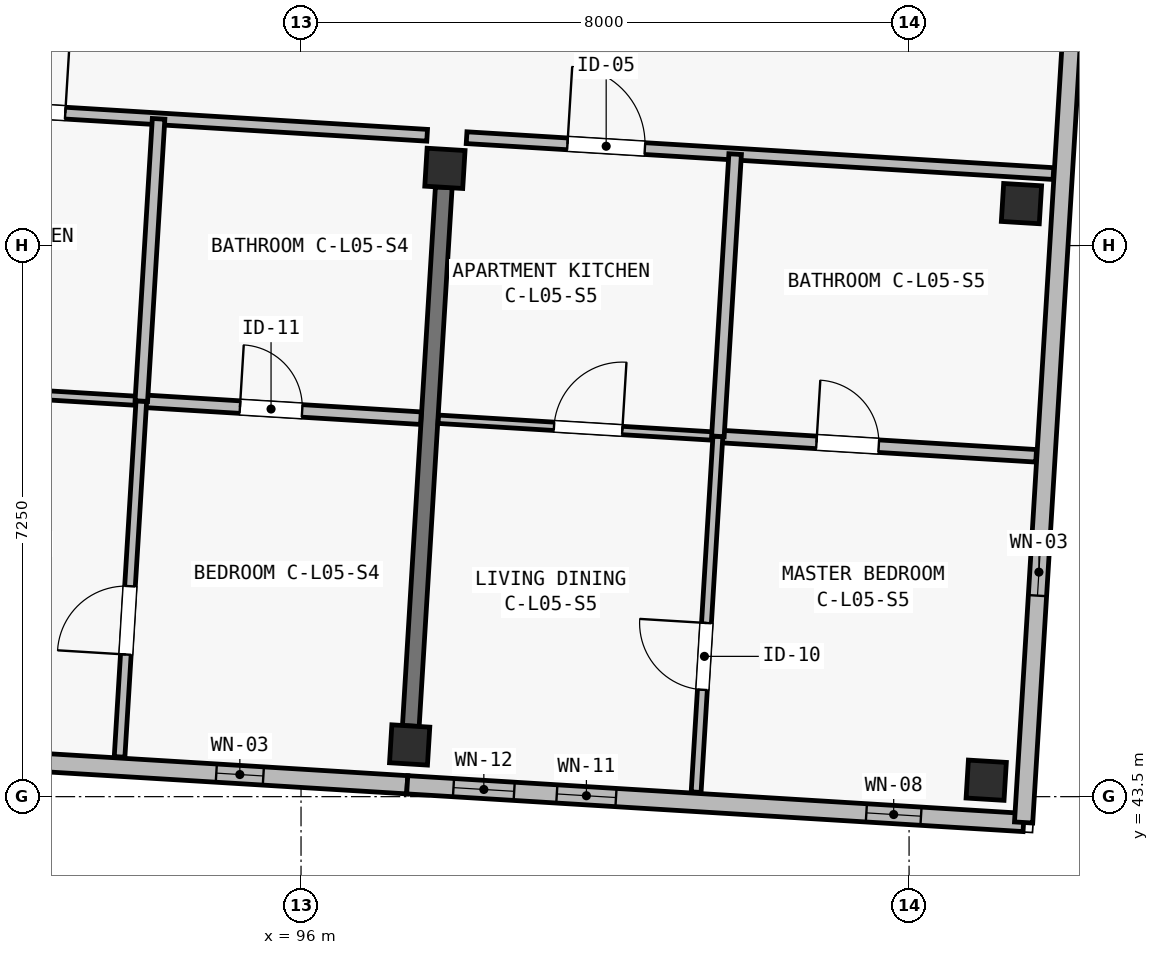
"""IFC4 building model, lengths in metres.
Left out: names, types, materials, properties, quantities, classifications, styles, units other than length and angle.
Written with IfcOpenShell. Run it as: python <this file> out.ifc"""

import sys

from ifc_helpers import new_model, si_unit, direction, frame, frame_2d, origin, origin_2d, place, context, subcontext, project, spatial, rectangle, extrude, element, fill, save


model = new_model("IFC4")
c1 = context("Model", 3, precision=1e-05, world=origin(), true_north=direction((0.0, 1.0)))
c2 = subcontext(c1, "Body", "Model", "MODEL_VIEW")
j1 = project(units=[si_unit("LENGTHUNIT", "METRE"), si_unit("PLANEANGLEUNIT", "RADIAN")], contexts=[c1])
p1 = place(None, origin())
s1 = spatial("IfcSite", under=j1, at=p1, CompositionType="ELEMENT")
p2 = place(p1, origin())
s2 = spatial("IfcBuilding", under=s1, at=p2, CompositionType="ELEMENT")
p3 = place(p2, frame((0.0, 0.0, 18.15)))
s3 = spatial("IfcBuildingStorey", under=s2, at=p3, CompositionType="ELEMENT", Elevation=18.15)
for number, where, z_axis, x_axis in (
    (1, (97.429, 44.18, 0.0), (0.0, 0.0, 1.0), (0.998, -0.061, 0.0)),
    (2, (97.893, 51.766, 0.0), (0.0, 0.0, 1.0), (0.998, -0.061, 0.0)),
    (3, (105.015, 43.716, 0.0), (0.0, 0.0, 1.0), (0.998, -0.061, 0.0)),
    (4, (105.479, 51.302, 0.0), (0.0, 0.0, 1.0), (0.998, -0.061, 0.0)),
):
    element("IfcColumn", number, at=place(p3, frame(where, z_axis=z_axis, x_axis=x_axis)), inside=s3, PredefinedType="COLUMN", context=c2, shape_type="SweptSolid", body=[
        extrude(rectangle(XDim=0.5, YDim=0.5, at=origin_2d()), origin(), (0.0, 0.0, 1.0), 3.25),
    ])
p4 = place(p3, frame((97.444, 44.43, 0.0), z_axis=(0.0, 0.0, 1.0), x_axis=(0.061070212127, 0.998133472633, 0.0)))
e5 = element("IfcWall", 5, at=p4, inside=s3, PredefinedType="SHEAR", context=c2, shape_type="SweptSolid", body=[
    extrude(rectangle(XDim=7.1, YDim=0.22, at=frame_2d((3.55, 0.0))), origin(), (0.0, 0.0, 1.0), 2.5),
])
p5 = place(p3, frame((97.397, 43.656, 0.0), z_axis=(0.0, 0.0, 1.0), x_axis=(-0.998135549572, 0.061036257095, 0.0)))
e6 = element("IfcWall", 6, at=p5, inside=s3, PredefinedType="SOLIDWALL", context=c2, shape_type="SweptSolid", body=[
    extrude(rectangle(XDim=7.6, YDim=0.24, at=frame_2d((3.8, 0.0))), origin(), (0.0, 0.0, 1.0), 3.0),
])
p6 = place(p5, frame((1.896, 0.0, 0.42)))
e7 = element("IfcOpeningElement", 7, at=p6, cuts=e6, PredefinedType="OPENING", context=c2, shape_type="SweptSolid", body=[
    extrude(rectangle(XDim=0.62, YDim=2.28, at=frame_2d((0.31, 1.14))), frame((0.0, 0.135, 0.0), z_axis=(0.0, -1.0, 0.0), x_axis=(1.0, 0.0, 0.0)), (0.0, 0.0, 1.0), 0.27),
])
p7 = place(p5, frame((5.073, 0.0, 0.42)))
e8 = element("IfcOpeningElement", 8, at=p7, cuts=e6, PredefinedType="OPENING", context=c2, shape_type="SweptSolid", body=[
    extrude(rectangle(XDim=0.68, YDim=2.24, at=frame_2d((0.34, 1.12))), frame((0.0, 0.135, 0.0), z_axis=(0.0, -1.0, 0.0), x_axis=(1.0, 0.0, 0.0)), (0.0, 0.0, 1.0), 0.27),
])
p8 = place(p3, frame((105.507, 43.16, 0.0), z_axis=(0.0, 0.0, 1.0), x_axis=(-0.998134248939, 0.061057522844, 0.0)))
e9 = element("IfcWall", 9, at=p8, inside=s3, PredefinedType="SOLIDWALL", context=c2, shape_type="SweptSolid", body=[
    extrude(rectangle(XDim=8.125, YDim=0.24, at=frame_2d((4.062, 0.0))), origin(), (0.0, 0.0, 1.0), 3.0),
])
p9 = place(p8, frame((1.353, 0.0, 0.48)))
e10 = element("IfcOpeningElement", 10, at=p9, cuts=e9, PredefinedType="OPENING", context=c2, shape_type="SweptSolid", body=[
    extrude(rectangle(XDim=0.72, YDim=2.16, at=frame_2d((0.36, 1.08))), frame((0.0, 0.135, 0.0), z_axis=(0.0, -1.0, 0.0), x_axis=(1.0, 0.0, 0.0)), (0.0, 0.0, 1.0), 0.27),
])
p10 = place(p8, frame((5.373, 0.0, 0.48)))
e11 = element("IfcOpeningElement", 11, at=p10, cuts=e9, PredefinedType="OPENING", context=c2, shape_type="SweptSolid", body=[
    extrude(rectangle(XDim=0.78, YDim=2.2, at=frame_2d((0.39, 1.1))), frame((0.0, 0.135, 0.0), z_axis=(0.0, -1.0, 0.0), x_axis=(1.0, 0.0, 0.0)), (0.0, 0.0, 1.0), 0.27),
])
p11 = place(p8, frame((6.715, 0.0, 0.52)))
e12 = element("IfcOpeningElement", 12, at=p11, cuts=e9, PredefinedType="OPENING", context=c2, shape_type="SweptSolid", body=[
    extrude(rectangle(XDim=0.8, YDim=2.3, at=frame_2d((0.4, 1.15))), frame((0.0, 0.135, 0.0), z_axis=(0.0, -1.0, 0.0), x_axis=(1.0, 0.0, 0.0)), (0.0, 0.0, 1.0), 0.27),
])
p12 = place(p3, frame((106.768, 63.771, 0.0), z_axis=(0.0, 0.0, 1.0), x_axis=(-0.061053332998, -0.99813450523, 0.0)))
e13 = element("IfcWall", 13, at=p12, inside=s3, PredefinedType="SOLIDWALL", context=c2, shape_type="SweptSolid", body=[
    extrude(rectangle(XDim=20.65, YDim=0.24, at=frame_2d((10.325, 0.0))), origin(), (0.0, 0.0, 1.0), 3.0),
])
p13 = place(p12, frame((2.63, 0.0, 0.52)))
e14 = element("IfcOpeningElement", 14, at=p13, cuts=e13, PredefinedType="OPENING", context=c2, shape_type="SweptSolid", body=[
    extrude(rectangle(XDim=0.78, YDim=2.2, at=frame_2d((0.39, 1.1))), frame((0.0, 0.135, 0.0), z_axis=(0.0, -1.0, 0.0), x_axis=(1.0, 0.0, 0.0)), (0.0, 0.0, 1.0), 0.27),
])
p14 = place(p12, frame((17.04, 0.0, 0.45)))
e15 = element("IfcOpeningElement", 15, at=p14, cuts=e13, PredefinedType="OPENING", context=c2, shape_type="SweptSolid", body=[
    extrude(rectangle(XDim=0.62, YDim=2.28, at=frame_2d((0.31, 1.14))), frame((0.0, 0.135, 0.0), z_axis=(0.0, -1.0, 0.0), x_axis=(1.0, 0.0, 0.0)), (0.0, 0.0, 1.0), 0.27),
])
p15 = place(p3, frame((90.593, 52.633, 0.0), z_axis=(0.0, 0.0, 1.0), x_axis=(0.998135538078, -0.061036445065, 0.0)))
e16 = element("IfcWall", 16, at=p15, inside=s3, PredefinedType="PARTITIONING", context=c2, shape_type="SweptSolid", body=[
    extrude(rectangle(XDim=7.08, YDim=0.155, at=frame_2d((3.54, 0.0))), origin(), (0.0, 0.0, 1.0), 2.97),
])
p16 = place(p15, frame((1.33, 0.0, 0.0)))
e17 = element("IfcOpeningElement", 17, at=p16, cuts=e16, PredefinedType="OPENING", context=c2, shape_type="SweptSolid", body=[
    extrude(rectangle(XDim=0.98, YDim=2.15, at=frame_2d((0.49, 1.075))), frame((0.0, 0.093, 0.0), z_axis=(0.0, -1.0, 0.0), x_axis=(1.0, 0.0, 0.0)), (0.0, 0.0, 1.0), 0.185),
])
p17 = place(p3, frame((90.221, 48.929, 0.0), z_axis=(0.0, 0.0, 1.0), x_axis=(0.99813243538, -0.061087162657, 0.0)))
e18 = element("IfcWall", 18, at=p17, inside=s3, PredefinedType="PARTITIONING", context=c2, shape_type="SweptSolid", body=[
    extrude(rectangle(XDim=3.685, YDim=0.12, at=frame_2d((1.842, 0.0))), origin(), (0.0, 0.0, 1.0), 2.97),
])
p18 = place(p17, frame((1.525, 0.0, 0.0)))
e19 = element("IfcOpeningElement", 19, at=p18, cuts=e18, PredefinedType="OPENING", context=c2, shape_type="SweptSolid", body=[
    extrude(rectangle(XDim=0.9, YDim=2.1, at=frame_2d((0.45, 1.05))), frame((0.0, 0.075, 0.0), z_axis=(0.0, -1.0, 0.0), x_axis=(1.0, 0.0, 0.0)), (0.0, 0.0, 1.0), 0.15),
])
p19 = place(p3, frame((93.899, 48.704, 0.0), z_axis=(0.0, 0.0, 1.0), x_axis=(0.998136719672, -0.061017119263, 0.0)))
e20 = element("IfcWall", 20, at=p19, inside=s3, PredefinedType="PLUMBINGWALL", context=c2, shape_type="SweptSolid", body=[
    extrude(rectangle(XDim=3.685, YDim=0.165, at=frame_2d((1.843, 0.0))), origin(), (0.0, 0.0, 1.0), 2.97),
])
p20 = place(p19, frame((1.3, 0.0, 0.0)))
e21 = element("IfcOpeningElement", 21, at=p20, cuts=e20, PredefinedType="OPENING", context=c2, shape_type="SweptSolid", body=[
    extrude(rectangle(XDim=0.82, YDim=2.08, at=frame_2d((0.41, 1.04))), frame((0.0, 0.097, 0.0), z_axis=(0.0, -1.0, 0.0), x_axis=(1.0, 0.0, 0.0)), (0.0, 0.0, 1.0), 0.195),
])
p21 = place(p3, frame((93.612, 44.023, 0.0), z_axis=(0.0, 0.0, 1.0), x_axis=(0.061062434628, 0.998133948465, 0.0)))
e22 = element("IfcWall", 22, at=p21, inside=s3, PredefinedType="PARTITIONING", context=c2, shape_type="SweptSolid", body=[
    extrude(rectangle(XDim=4.69, YDim=0.14, at=frame_2d((2.345, 0.0))), origin(), (0.0, 0.0, 1.0), 2.97),
])
p22 = place(p21, frame((1.35, 0.0, 0.0)))
e23 = element("IfcOpeningElement", 23, at=p22, cuts=e22, PredefinedType="OPENING", context=c2, shape_type="SweptSolid", body=[
    extrude(rectangle(XDim=0.9, YDim=2.1, at=frame_2d((0.45, 1.05))), frame((0.0, 0.085, 0.0), z_axis=(0.0, -1.0, 0.0), x_axis=(1.0, 0.0, 0.0)), (0.0, 0.0, 1.0), 0.17),
])
p23 = place(p3, frame((93.899, 48.704, 0.0), z_axis=(0.0, 0.0, 1.0), x_axis=(0.061034005467, 0.998135687257, 0.0)))
e24 = element("IfcWall", 24, at=p23, inside=s3, PredefinedType="PLUMBINGWALL", context=c2, shape_type="SweptSolid", body=[
    extrude(rectangle(XDim=3.72, YDim=0.165, at=frame_2d((1.86, 0.0))), origin(), (0.0, 0.0, 1.0), 2.97),
])
p24 = place(p3, frame((98.178, 52.169, 0.0), z_axis=(0.0, 0.0, 1.0), x_axis=(0.998133272394, -0.061073484761, 0.0)))
e25 = element("IfcWall", 25, at=p24, inside=s3, PredefinedType="PARTITIONING", context=c2, shape_type="SweptSolid", body=[
    extrude(rectangle(XDim=7.735, YDim=0.155, at=frame_2d((3.868, 0.0))), origin(), (0.0, 0.0, 1.0), 2.97),
])
p25 = place(p24, frame((1.33, 0.0, 0.0)))
e26 = element("IfcOpeningElement", 26, at=p25, cuts=e25, PredefinedType="OPENING", context=c2, shape_type="SweptSolid", body=[
    extrude(rectangle(XDim=1.02, YDim=2.2, at=frame_2d((0.51, 1.1))), frame((0.0, 0.093, 0.0), z_axis=(0.0, -1.0, 0.0), x_axis=(1.0, 0.0, 0.0)), (0.0, 0.0, 1.0), 0.185),
])
p26 = place(p3, frame((97.806, 48.465, 0.0), z_axis=(0.0, 0.0, 1.0), x_axis=(0.998136719672, -0.061017119263, 0.0)))
e27 = element("IfcWall", 27, at=p26, inside=s3, PredefinedType="PARTITIONING", context=c2, shape_type="SweptSolid", body=[
    extrude(rectangle(XDim=3.685, YDim=0.11, at=frame_2d((1.843, 0.0))), origin(), (0.0, 0.0, 1.0), 2.97),
])
p27 = place(p26, frame((1.525, 0.0, 0.0)))
e28 = element("IfcOpeningElement", 28, at=p27, cuts=e27, PredefinedType="OPENING", context=c2, shape_type="SweptSolid", body=[
    extrude(rectangle(XDim=0.9, YDim=2.1, at=frame_2d((0.45, 1.05))), frame((0.0, 0.07, 0.0), z_axis=(0.0, -1.0, 0.0), x_axis=(1.0, 0.0, 0.0)), (0.0, 0.0, 1.0), 0.14),
])
p28 = place(p3, frame((101.485, 48.24, 0.0), z_axis=(0.0, 0.0, 1.0), x_axis=(0.998134581856, -0.061052080255, 0.0)))
e29 = element("IfcWall", 29, at=p28, inside=s3, PredefinedType="PLUMBINGWALL", context=c2, shape_type="SweptSolid", body=[
    extrude(rectangle(XDim=4.195, YDim=0.165, at=frame_2d((2.097, 0.0))), origin(), (0.0, 0.0, 1.0), 2.97),
])
p29 = place(p28, frame((1.3, 0.0, 0.0)))
e30 = element("IfcOpeningElement", 30, at=p29, cuts=e29, PredefinedType="OPENING", context=c2, shape_type="SweptSolid", body=[
    extrude(rectangle(XDim=0.82, YDim=2.08, at=frame_2d((0.41, 1.04))), frame((0.0, 0.097, 0.0), z_axis=(0.0, -1.0, 0.0), x_axis=(1.0, 0.0, 0.0)), (0.0, 0.0, 1.0), 0.195),
])
p30 = place(p3, frame((101.198, 43.559, 0.0), z_axis=(0.0, 0.0, 1.0), x_axis=(0.061059262019, 0.998134142549, 0.0)))
e31 = element("IfcWall", 31, at=p30, inside=s3, PredefinedType="PARTITIONING", context=c2, shape_type="SweptSolid", body=[
    extrude(rectangle(XDim=4.69, YDim=0.13, at=frame_2d((2.345, 0.0))), origin(), (0.0, 0.0, 1.0), 2.97),
])
p31 = place(p30, frame((1.35, 0.0, 0.0)))
e32 = element("IfcOpeningElement", 32, at=p31, cuts=e31, PredefinedType="OPENING", context=c2, shape_type="SweptSolid", body=[
    extrude(rectangle(XDim=0.88, YDim=2.1, at=frame_2d((0.44, 1.05))), frame((0.0, 0.08, 0.0), z_axis=(0.0, -1.0, 0.0), x_axis=(1.0, 0.0, 0.0)), (0.0, 0.0, 1.0), 0.16),
])
p32 = place(p3, frame((101.485, 48.24, 0.0), z_axis=(0.0, 0.0, 1.0), x_axis=(0.061038003798, 0.998135442759, 0.0)))
e33 = element("IfcWall", 33, at=p32, inside=s3, PredefinedType="PLUMBINGWALL", context=c2, shape_type="SweptSolid", body=[
    extrude(rectangle(XDim=3.72, YDim=0.165, at=frame_2d((1.86, 0.0))), origin(), (0.0, 0.0, 1.0), 2.97),
])
p33 = place(p6, origin())
e34 = element("IfcWindow", 34, at=p33, inside=s3, PartitioningType="SINGLE_PANEL", PredefinedType="WINDOW", context=c2, shape_type="SweptSolid", body=[
    extrude(rectangle(XDim=0.62, YDim=2.28, at=frame_2d((0.31, 1.14))), frame((0.0, 0.03, 0.0), z_axis=(0.0, -1.0, 0.0), x_axis=(1.0, 0.0, 0.0)), (0.0, 0.0, 1.0), 0.06),
])
fill(e7, e34)
p34 = place(p9, origin())
e35 = element("IfcWindow", 35, at=p34, inside=s3, PartitioningType="SINGLE_PANEL", PredefinedType="WINDOW", context=c2, shape_type="SweptSolid", body=[
    extrude(rectangle(XDim=0.72, YDim=2.16, at=frame_2d((0.36, 1.08))), frame((0.0, 0.03, 0.0), z_axis=(0.0, -1.0, 0.0), x_axis=(1.0, 0.0, 0.0)), (0.0, 0.0, 1.0), 0.06),
])
fill(e10, e35)
p35 = place(p10, origin())
e36 = element("IfcWindow", 36, at=p35, inside=s3, PartitioningType="SINGLE_PANEL", PredefinedType="WINDOW", context=c2, shape_type="SweptSolid", body=[
    extrude(rectangle(XDim=0.78, YDim=2.2, at=frame_2d((0.39, 1.1))), frame((0.0, 0.03, 0.0), z_axis=(0.0, -1.0, 0.0), x_axis=(1.0, 0.0, 0.0)), (0.0, 0.0, 1.0), 0.06),
])
fill(e11, e36)
p36 = place(p11, origin())
e37 = element("IfcWindow", 37, at=p36, inside=s3, PartitioningType="SINGLE_PANEL", PredefinedType="WINDOW", context=c2, shape_type="SweptSolid", body=[
    extrude(rectangle(XDim=0.8, YDim=2.3, at=frame_2d((0.4, 1.15))), frame((0.0, 0.03, 0.0), z_axis=(0.0, -1.0, 0.0), x_axis=(1.0, 0.0, 0.0)), (0.0, 0.0, 1.0), 0.06),
])
fill(e12, e37)
p37 = place(p14, origin())
e38 = element("IfcWindow", 38, at=p37, inside=s3, PartitioningType="SINGLE_PANEL", PredefinedType="WINDOW", context=c2, shape_type="SweptSolid", body=[
    extrude(rectangle(XDim=0.62, YDim=2.28, at=frame_2d((0.31, 1.14))), frame((0.0, 0.03, 0.0), z_axis=(0.0, -1.0, 0.0), x_axis=(1.0, 0.0, 0.0)), (0.0, 0.0, 1.0), 0.06),
])
fill(e15, e38)
p38 = place(p16, origin())
e39 = element("IfcDoor", 39, at=p38, inside=s3, OperationType="SINGLE_SWING_RIGHT", PredefinedType="DOOR", context=c2, shape_type="SweptSolid", body=[
    extrude(rectangle(XDim=0.98, YDim=2.15, at=frame_2d((0.49, 1.075))), frame((0.0, 0.025, 0.0), z_axis=(0.0, -1.0, 0.0), x_axis=(1.0, 0.0, 0.0)), (0.0, 0.0, 1.0), 0.05),
])
fill(e17, e39)
p39 = place(p20, origin())
e40 = element("IfcDoor", 40, at=p39, inside=s3, OperationType="SINGLE_SWING_LEFT", PredefinedType="DOOR", context=c2, shape_type="SweptSolid", body=[
    extrude(rectangle(XDim=0.82, YDim=2.08, at=frame_2d((0.41, 1.04))), frame((0.0, 0.025, 0.0), z_axis=(0.0, -1.0, 0.0), x_axis=(1.0, 0.0, 0.0)), (0.0, 0.0, 1.0), 0.05),
])
fill(e21, e40)
p40 = place(p22, origin())
e41 = element("IfcDoor", 41, at=p40, inside=s3, OperationType="SINGLE_SWING_LEFT", PredefinedType="DOOR", context=c2, shape_type="SweptSolid", body=[
    extrude(rectangle(XDim=0.9, YDim=2.1, at=frame_2d((0.45, 1.05))), frame((0.0, 0.025, 0.0), z_axis=(0.0, -1.0, 0.0), x_axis=(1.0, 0.0, 0.0)), (0.0, 0.0, 1.0), 0.05),
])
fill(e23, e41)
p41 = place(p25, origin())
e42 = element("IfcDoor", 42, at=p41, inside=s3, OperationType="SINGLE_SWING_LEFT", PredefinedType="DOOR", context=c2, shape_type="SweptSolid", body=[
    extrude(rectangle(XDim=1.02, YDim=2.2, at=frame_2d((0.51, 1.1))), frame((0.0, 0.025, 0.0), z_axis=(0.0, -1.0, 0.0), x_axis=(1.0, 0.0, 0.0)), (0.0, 0.0, 1.0), 0.05),
])
fill(e26, e42)
p42 = place(p27, origin())
e43 = element("IfcDoor", 43, at=p42, inside=s3, OperationType="SINGLE_SWING_RIGHT", PredefinedType="DOOR", context=c2, shape_type="SweptSolid", body=[
    extrude(rectangle(XDim=0.9, YDim=2.1, at=frame_2d((0.45, 1.05))), frame((0.0, 0.025, 0.0), z_axis=(0.0, -1.0, 0.0), x_axis=(1.0, 0.0, 0.0)), (0.0, 0.0, 1.0), 0.05),
])
fill(e28, e43)
p43 = place(p29, origin())
e44 = element("IfcDoor", 44, at=p43, inside=s3, OperationType="SINGLE_SWING_LEFT", PredefinedType="DOOR", context=c2, shape_type="SweptSolid", body=[
    extrude(rectangle(XDim=0.82, YDim=2.08, at=frame_2d((0.41, 1.04))), frame((0.0, 0.025, 0.0), z_axis=(0.0, -1.0, 0.0), x_axis=(1.0, 0.0, 0.0)), (0.0, 0.0, 1.0), 0.05),
])
fill(e30, e44)
p44 = place(p31, origin())
e45 = element("IfcDoor", 45, at=p44, inside=s3, OperationType="SINGLE_SWING_RIGHT", PredefinedType="DOOR", context=c2, shape_type="SweptSolid", body=[
    extrude(rectangle(XDim=0.88, YDim=2.1, at=frame_2d((0.44, 1.05))), frame((0.0, 0.025, 0.0), z_axis=(0.0, -1.0, 0.0), x_axis=(1.0, 0.0, 0.0)), (0.0, 0.0, 1.0), 0.05),
])
fill(e32, e45)
save(model, sys.argv[1])
